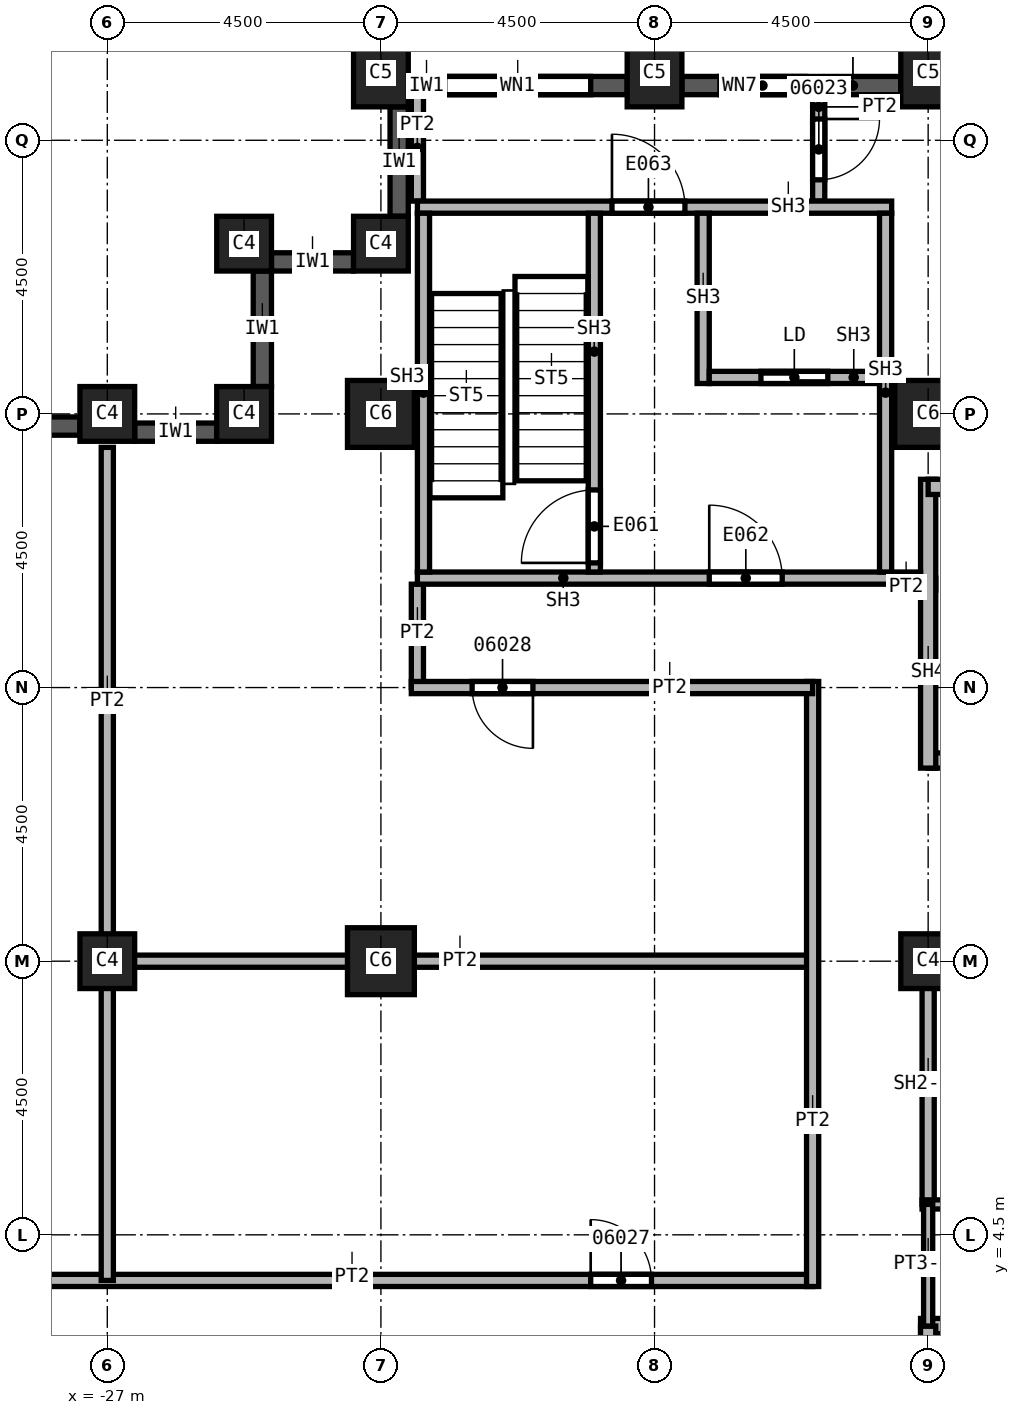
"""IFC4 building model, lengths in metres.
Left out: names, types, materials, properties, quantities, classifications, styles, units other than length and angle.
Written with IfcOpenShell. Run it as: python <this file> out.ifc"""

import sys

from ifc_helpers import new_model, si_unit, direction, frame, frame_2d, origin, origin_2d, place, context, subcontext, project, spatial, rectangle, extrude, element, fill, save


model = new_model("IFC4")
c1 = context("Model", 3, precision=1e-05, world=origin(), true_north=direction((0.0, 1.0)))
c2 = subcontext(c1, "Body", "Model", "MODEL_VIEW")
j1 = project(units=[si_unit("LENGTHUNIT", "METRE"), si_unit("PLANEANGLEUNIT", "RADIAN")], contexts=[c1])
p1 = place(None, origin())
s1 = spatial("IfcSite", under=j1, at=p1, CompositionType="ELEMENT")
p2 = place(p1, origin())
s2 = spatial("IfcBuilding", under=s1, at=p2, CompositionType="ELEMENT")
p3 = place(p2, frame((0.0, 0.0, 130.0)))
s3 = spatial("IfcBuildingStorey", under=s2, at=p3, CompositionType="ELEMENT", Elevation=130.0)
for number, where, z_axis, x_axis in (
    (1, (-13.5, 18.0, 0.0), (0.0, 0.0, 1.0), (1.0, 0.0, 0.0)),
    (2, (-22.5, 9.0, 0.0), (0.0, 0.0, 1.0), (1.0, 0.0, 0.0)),
    (3, (-22.5, 18.0, 0.0), (0.0, 0.0, 1.0), (1.0, 0.0, 0.0)),
):
    element("IfcColumn", number, at=place(p3, frame(where, z_axis=z_axis, x_axis=x_axis)), inside=s3, PredefinedType="COLUMN", context=c2, shape_type="SweptSolid", body=[
        extrude(rectangle(XDim=1.1, YDim=1.1, at=origin_2d()), origin(), (0.0, 0.0, 1.0), 3.7),
    ])
p4 = place(p3, frame((-13.5, 9.0, 0.0), z_axis=(0.0, 0.0, 1.0), x_axis=(1.0, 0.0, 0.0)))
e4 = element("IfcColumn", 4, at=p4, inside=s3, PredefinedType="COLUMN", context=c2, shape_type="SweptSolid", body=[
    extrude(rectangle(XDim=0.9, YDim=0.9, at=origin_2d()), origin(), (0.0, 0.0, 1.0), 3.7),
])
for number, where, z_axis, x_axis in (
    (5, (-13.5, 23.6, 0.0), (0.0, 0.0, 1.0), (1.0, 0.0, 0.0)),
    (6, (-18.0, 23.6, 0.0), (0.0, 0.0, 1.0), (1.0, 0.0, 0.0)),
    (7, (-22.5, 23.6, 0.0), (0.0, 0.0, 1.0), (1.0, 0.0, 0.0)),
):
    element("IfcColumn", number, at=place(p3, frame(where, z_axis=z_axis, x_axis=x_axis)), inside=s3, PredefinedType="COLUMN", context=c2, shape_type="SweptSolid", body=[
        extrude(rectangle(XDim=0.9, YDim=1.1, at=origin_2d()), origin(), (0.0, 0.0, 1.0), 3.7),
    ])
for number, where, z_axis, x_axis in (
    (8, (-27.0, 9.0, 0.0), (0.0, 0.0, 1.0), (1.0, 0.0, 0.0)),
    (9, (-27.0, 18.0, 0.0), (0.0, 0.0, 1.0), (1.0, 0.0, 0.0)),
    (10, (-22.5, 20.8, 0.0), (0.0, 0.0, 1.0), (1.0, 0.0, 0.0)),
    (11, (-24.75, 20.8, 0.0), (0.0, 0.0, 1.0), (1.0, 0.0, 0.0)),
    (12, (-24.75, 18.0, 0.0), (0.0, 0.0, 1.0), (1.0, 0.0, 0.0)),
):
    element("IfcColumn", number, at=place(p3, frame(where, z_axis=z_axis, x_axis=x_axis)), inside=s3, PredefinedType="COLUMN", context=c2, shape_type="SweptSolid", body=[
        extrude(rectangle(XDim=0.9, YDim=0.9, at=origin_2d()), origin(), (0.0, 0.0, 1.0), 3.7),
    ])
p5 = place(p3, frame((-22.2, 23.05, 0.0), z_axis=(0.0, 0.0, 1.0), x_axis=(0.0, -1.0, 0.0)))
e13 = element("IfcWall", 13, at=p5, inside=s3, PredefinedType="SOLIDWALL", context=c2, shape_type="SweptSolid", body=[
    extrude(rectangle(XDim=1.8, YDim=0.3, at=frame_2d((0.9, 0.0))), origin(), (0.0, 0.0, 1.0), 3.1),
])
p6 = place(p3, frame((-22.95, 20.5, 0.0), z_axis=(0.0, 0.0, 1.0), x_axis=(-1.0, 0.0, 0.0)))
e14 = element("IfcWall", 14, at=p6, inside=s3, PredefinedType="SOLIDWALL", context=c2, shape_type="SweptSolid", body=[
    extrude(rectangle(XDim=1.35, YDim=0.3, at=frame_2d((0.675, 0.0))), origin(), (0.0, 0.0, 1.0), 3.1),
])
p7 = place(p3, frame((-24.45, 20.35, 0.0), z_axis=(0.0, 0.0, 1.0), x_axis=(0.0, -1.0, 0.0)))
e15 = element("IfcWall", 15, at=p7, inside=s3, PredefinedType="SOLIDWALL", context=c2, shape_type="SweptSolid", body=[
    extrude(rectangle(XDim=1.9, YDim=0.3, at=frame_2d((0.95, 0.0))), origin(), (0.0, 0.0, 1.0), 3.1),
])
p8 = place(p3, frame((-25.2, 17.7, 0.0), z_axis=(0.0, 0.0, 1.0), x_axis=(-1.0, 0.0, 0.0)))
e16 = element("IfcWall", 16, at=p8, inside=s3, PredefinedType="SOLIDWALL", context=c2, shape_type="SweptSolid", body=[
    extrude(rectangle(XDim=1.35, YDim=0.3, at=frame_2d((0.675, 0.0))), origin(), (0.0, 0.0, 1.0), 3.1),
])
p9 = place(p3, frame((-27.45, 17.8, 0.0), z_axis=(0.0, 0.0, 1.0), x_axis=(-1.0, 0.0, 0.0)))
e17 = element("IfcWall", 17, at=p9, inside=s3, PredefinedType="SOLIDWALL", context=c2, shape_type="SweptSolid", body=[
    extrude(rectangle(XDim=3.6, YDim=0.3, at=frame_2d((1.8, 0.0))), origin(), (0.0, 0.0, 1.0), 3.1),
])
p10 = place(p9, frame((0.6, 0.0, 0.8)))
e18 = element("IfcOpeningElement", 18, at=p10, cuts=e17, PredefinedType="OPENING", context=c2, shape_type="SweptSolid", body=[
    extrude(rectangle(XDim=2.4, YDim=1.95, at=frame_2d((1.2, 0.975))), frame((0.0, 0.15, 0.0), z_axis=(0.0, -1.0, 0.0), x_axis=(1.0, 0.0, 0.0)), (0.0, 0.0, 1.0), 0.3),
])
p11 = place(p3, frame((-13.95, 23.4, 0.0), z_axis=(0.0, 0.0, 1.0), x_axis=(-1.0, 0.0, 0.0)))
e19 = element("IfcWall", 19, at=p11, inside=s3, PredefinedType="SOLIDWALL", context=c2, shape_type="SweptSolid", body=[
    extrude(rectangle(XDim=3.6, YDim=0.3, at=frame_2d((1.8, 0.0))), origin(), (0.0, 0.0, 1.0), 3.1),
])
p12 = place(p11, frame((1.575, 0.0, 0.8)))
e20 = element("IfcOpeningElement", 20, at=p12, cuts=e19, PredefinedType="OPENING", context=c2, shape_type="SweptSolid", body=[
    extrude(rectangle(XDim=1.4, YDim=1.95, at=frame_2d((0.7, 0.975))), frame((0.0, 0.15, 0.0), z_axis=(0.0, -1.0, 0.0), x_axis=(1.0, 0.0, 0.0)), (0.0, 0.0, 1.0), 0.3),
])
p13 = place(p3, frame((-18.45, 23.4, 0.0), z_axis=(0.0, 0.0, 1.0), x_axis=(-1.0, 0.0, 0.0)))
e21 = element("IfcWall", 21, at=p13, inside=s3, PredefinedType="SOLIDWALL", context=c2, shape_type="SweptSolid", body=[
    extrude(rectangle(XDim=3.6, YDim=0.3, at=frame_2d((1.8, 0.0))), origin(), (0.0, 0.0, 1.0), 3.1),
])
p14 = place(p13, frame((0.6, 0.0, 0.8)))
e22 = element("IfcOpeningElement", 22, at=p14, cuts=e21, PredefinedType="OPENING", context=c2, shape_type="SweptSolid", body=[
    extrude(rectangle(XDim=2.4, YDim=1.95, at=frame_2d((1.2, 0.975))), frame((0.0, 0.15, 0.0), z_axis=(0.0, -1.0, 0.0), x_axis=(1.0, 0.0, 0.0)), (0.0, 0.0, 1.0), 0.3),
])
p15 = place(p3, frame((-33.85, 3.75, 0.0), z_axis=(0.0, 0.0, 1.0), x_axis=(1.0, 0.0, 0.0)))
e23 = element("IfcWall", 23, at=p15, inside=s3, PredefinedType="PARTITIONING", context=c2, shape_type="SweptSolid", body=[
    extrude(rectangle(XDim=18.45, YDim=0.2, at=frame_2d((9.225, 0.0))), origin(), (0.0, 0.0, 1.0), 3.7),
])
p16 = place(p15, frame((14.8, 0.0, 0.0)))
e24 = element("IfcOpeningElement", 24, at=p16, cuts=e23, PredefinedType="OPENING", context=c2, shape_type="SweptSolid", body=[
    extrude(rectangle(XDim=1.0, YDim=2.1, at=frame_2d((0.5, 1.05))), frame((0.0, 0.1, 0.0), z_axis=(0.0, -1.0, 0.0), x_axis=(1.0, 0.0, 0.0)), (0.0, 0.0, 1.0), 0.2),
])
p17 = place(p3, frame((-27.1, 9.0, 0.0), z_axis=(0.0, 0.0, 1.0), x_axis=(1.0, 0.0, 0.0)))
e25 = element("IfcWall", 25, at=p17, inside=s3, PredefinedType="PARTITIONING", context=c2, shape_type="SweptSolid", body=[
    extrude(rectangle(XDim=11.7, YDim=0.2, at=frame_2d((5.85, 0.0))), origin(), (0.0, 0.0, 1.0), 3.7),
])
p18 = place(p3, frame((-27.0, 3.75, 0.0), z_axis=(0.0, 0.0, 1.0), x_axis=(0.0, 1.0, 0.0)))
e26 = element("IfcWall", 26, at=p18, inside=s3, PredefinedType="PARTITIONING", context=c2, shape_type="SweptSolid", body=[
    extrude(rectangle(XDim=13.7, YDim=0.2, at=frame_2d((6.85, 0.0))), origin(), (0.0, 0.0, 1.0), 3.7),
])
p19 = place(p3, frame((-21.9, 13.5, 0.0), z_axis=(0.0, 0.0, 1.0), x_axis=(0.0, 1.0, 0.0)))
e27 = element("IfcWall", 27, at=p19, inside=s3, PredefinedType="PARTITIONING", context=c2, shape_type="SweptSolid", body=[
    extrude(rectangle(XDim=1.7, YDim=0.2, at=frame_2d((0.85, 0.0))), origin(), (0.0, 0.0, 1.0), 3.7),
])
p20 = place(p3, frame((-21.9, 21.5, 0.0), z_axis=(0.0, 0.0, 1.0), x_axis=(0.0, 1.0, 0.0)))
e28 = element("IfcWall", 28, at=p20, inside=s3, PredefinedType="PARTITIONING", context=c2, shape_type="SweptSolid", body=[
    extrude(rectangle(XDim=1.75, YDim=0.2, at=frame_2d((0.875, 0.0))), origin(), (0.0, 0.0, 1.0), 3.7),
])
p21 = place(p3, frame((-15.4, 3.65, 0.0), z_axis=(0.0, 0.0, 1.0), x_axis=(0.0, 1.0, 0.0)))
e29 = element("IfcWall", 29, at=p21, inside=s3, PredefinedType="PARTITIONING", context=c2, shape_type="SweptSolid", body=[
    extrude(rectangle(XDim=9.95, YDim=0.2, at=frame_2d((4.975, 0.0))), origin(), (0.0, 0.0, 1.0), 3.7),
])
p22 = place(p3, frame((-15.4, 13.5, 0.0), z_axis=(0.0, 0.0, 1.0), x_axis=(-1.0, 0.0, 0.0)))
e30 = element("IfcWall", 30, at=p22, inside=s3, PredefinedType="PARTITIONING", context=c2, shape_type="SweptSolid", body=[
    extrude(rectangle(XDim=6.6, YDim=0.2, at=frame_2d((3.3, 0.0))), origin(), (0.0, 0.0, 1.0), 3.7),
])
p23 = place(p22, frame((4.6, 0.0, 0.0)))
e31 = element("IfcOpeningElement", 31, at=p23, cuts=e30, PredefinedType="OPENING", context=c2, shape_type="SweptSolid", body=[
    extrude(rectangle(XDim=1.0, YDim=2.1, at=frame_2d((0.5, 1.05))), frame((0.0, 0.1, 0.0), z_axis=(0.0, -1.0, 0.0), x_axis=(1.0, 0.0, 0.0)), (0.0, 0.0, 1.0), 0.2),
])
p24 = place(p3, frame((-15.3, 23.25, 0.0), z_axis=(0.0, 0.0, 1.0), x_axis=(0.0, -1.0, 0.0)))
e32 = element("IfcWall", 32, at=p24, inside=s3, PredefinedType="PARTITIONING", context=c2, shape_type="SweptSolid", body=[
    extrude(rectangle(XDim=1.75, YDim=0.2, at=frame_2d((0.875, 0.0))), origin(), (0.0, 0.0, 1.0), 3.7),
])
p25 = place(p24, frame((0.4, 0.0, 0.0)))
e33 = element("IfcOpeningElement", 33, at=p25, cuts=e32, PredefinedType="OPENING", context=c2, shape_type="SweptSolid", body=[
    extrude(rectangle(XDim=1.0, YDim=2.1, at=frame_2d((0.5, 1.05))), frame((0.0, 0.1, 0.0), z_axis=(0.0, -1.0, 0.0), x_axis=(1.0, 0.0, 0.0)), (0.0, 0.0, 1.0), 0.2),
])
p26 = place(p3, frame((-14.1, 15.2, 0.0), z_axis=(0.0, 0.0, 1.0), x_axis=(1.0, 0.0, 0.0)))
e34 = element("IfcWall", 34, at=p26, inside=s3, PredefinedType="PARTITIONING", context=c2, shape_type="SweptSolid", body=[
    extrude(rectangle(XDim=0.725, YDim=0.2, at=frame_2d((0.363, 0.0))), origin(), (0.0, 0.0, 1.0), 3.7),
])
p27 = place(p3, frame((-13.5, 5.0, 0.0), z_axis=(0.0, 0.0, 1.0), x_axis=(0.0, 1.0, 0.0)))
e35 = element("IfcWall", 35, at=p27, inside=s3, PredefinedType="SOLIDWALL", context=c2, shape_type="SweptSolid", body=[
    extrude(rectangle(XDim=4.1, YDim=0.2, at=frame_2d((2.05, 0.0))), origin(), (0.0, 0.0, 1.0), 2.938),
])
p28 = place(p3, frame((-13.5, 9.0, 0.0), z_axis=(0.0, 0.0, 1.0), x_axis=(1.0, 0.0, 0.0)))
e36 = element("IfcWall", 36, at=p28, inside=s3, PredefinedType="SOLIDWALL", context=c2, shape_type="SweptSolid", body=[
    extrude(rectangle(XDim=3.0, YDim=0.2, at=frame_2d((1.5, 0.0))), origin(), (0.0, 0.0, 1.0), 2.938),
])
p29 = place(p3, frame((-13.625, 3.0, 0.0), z_axis=(0.0, 0.0, 1.0), x_axis=(1.0, 0.0, 0.0)))
e37 = element("IfcWall", 37, at=p29, inside=s3, PredefinedType="SOLIDWALL", context=c2, shape_type="SweptSolid", body=[
    extrude(rectangle(XDim=6.125, YDim=0.25, at=frame_2d((3.062, 0.0))), origin(), (0.0, 0.0, 1.0), 3.7),
])
p30 = place(p29, frame((3.25, 0.0, 0.0)))
e38 = element("IfcOpeningElement", 38, at=p30, cuts=e37, PredefinedType="OPENING", context=c2, shape_type="SweptSolid", body=[
    extrude(rectangle(XDim=1.1, YDim=2.1, at=frame_2d((0.55, 1.05))), frame((0.0, 0.125, 0.0), z_axis=(0.0, -1.0, 0.0), x_axis=(1.0, 0.0, 0.0)), (0.0, 0.0, 1.0), 0.25),
])
p31 = place(p3, frame((-13.5, -3.0, 0.0), z_axis=(0.0, 0.0, 1.0), x_axis=(0.0, 1.0, 0.0)))
e39 = element("IfcWall", 39, at=p31, inside=s3, PredefinedType="SOLIDWALL", context=c2, shape_type="SweptSolid", body=[
    extrude(rectangle(XDim=6.0, YDim=0.25, at=frame_2d((3.0, 0.0))), origin(), (0.0, 0.0, 1.0), 2.938),
])
p32 = place(p3, frame((-13.5, 12.3, 0.0), z_axis=(0.0, 0.0, 1.0), x_axis=(1.0, 0.0, 0.0)))
e40 = element("IfcWall", 40, at=p32, inside=s3, PredefinedType="SOLIDWALL", context=c2, shape_type="SweptSolid", body=[
    extrude(rectangle(XDim=9.125, YDim=0.25, at=frame_2d((4.562, 0.0))), origin(), (0.0, 0.0, 1.0), 3.7),
])
p33 = place(p32, frame((0.6, 0.0, 0.0)))
e41 = element("IfcOpeningElement", 41, at=p33, cuts=e40, PredefinedType="OPENING", context=c2, shape_type="SweptSolid", body=[
    extrude(rectangle(XDim=1.2, YDim=2.1, at=frame_2d((0.6, 1.05))), frame((0.0, 0.125, 0.0), z_axis=(0.0, -1.0, 0.0), x_axis=(1.0, 0.0, 0.0)), (0.0, 0.0, 1.0), 0.25),
])
p34 = place(p3, frame((-13.5, 12.175, 0.0), z_axis=(0.0, 0.0, 1.0), x_axis=(0.0, 1.0, 0.0)))
e42 = element("IfcWall", 42, at=p34, inside=s3, PredefinedType="SOLIDWALL", context=c2, shape_type="SweptSolid", body=[
    extrude(rectangle(XDim=4.75, YDim=0.25, at=frame_2d((2.375, 0.0))), origin(), (0.0, 0.0, 1.0), 3.7),
])
p35 = place(p3, frame((-13.5, 16.8, 0.0), z_axis=(0.0, 0.0, 1.0), x_axis=(1.0, 0.0, 0.0)))
e43 = element("IfcWall", 43, at=p35, inside=s3, PredefinedType="SOLIDWALL", context=c2, shape_type="SweptSolid", body=[
    extrude(rectangle(XDim=9.125, YDim=0.25, at=frame_2d((4.562, 0.0))), origin(), (0.0, 0.0, 1.0), 3.7),
])
p36 = place(p3, frame((-13.6, 5.0, 0.0), z_axis=(0.0, 0.0, 1.0), x_axis=(1.0, 0.0, 0.0)))
e44 = element("IfcWall", 44, at=p36, inside=s3, PredefinedType="PARTITIONING", context=c2, shape_type="SweptSolid", body=[
    extrude(rectangle(XDim=3.1, YDim=0.15, at=frame_2d((1.55, 0.0))), origin(), (0.0, 0.0, 1.0), 3.7),
])
p37 = place(p3, frame((-13.5, 3.0, 0.0), z_axis=(0.0, 0.0, 1.0), x_axis=(0.0, 1.0, 0.0)))
e45 = element("IfcWall", 45, at=p37, inside=s3, PredefinedType="PARTITIONING", context=c2, shape_type="SweptSolid", body=[
    extrude(rectangle(XDim=2.0, YDim=0.15, at=frame_2d((1.0, 0.0))), origin(), (0.0, 0.0, 1.0), 2.938),
])
p38 = place(p3, frame((-21.9, 15.3, 0.0), z_axis=(0.0, 0.0, 1.0), x_axis=(1.0, 0.0, 0.0)))
e46 = element("IfcWall", 46, at=p38, inside=s3, PredefinedType="SOLIDWALL", context=c2, shape_type="SweptSolid", body=[
    extrude(rectangle(XDim=8.275, YDim=0.2, at=frame_2d((4.137, 0.0))), origin(), (0.0, 0.0, 1.0), 3.7),
])
p39 = place(p38, frame((4.8, 0.0, 0.0)))
e47 = element("IfcOpeningElement", 47, at=p39, cuts=e46, PredefinedType="OPENING", context=c2, shape_type="SweptSolid", body=[
    extrude(rectangle(XDim=1.2, YDim=2.1, at=frame_2d((0.6, 1.05))), frame((0.0, 0.1, 0.0), z_axis=(0.0, -1.0, 0.0), x_axis=(1.0, 0.0, 0.0)), (0.0, 0.0, 1.0), 0.2),
])
p40 = place(p3, frame((-21.9, 21.4, 0.0), z_axis=(0.0, 0.0, 1.0), x_axis=(1.0, 0.0, 0.0)))
e48 = element("IfcWall", 48, at=p40, inside=s3, PredefinedType="SOLIDWALL", context=c2, shape_type="SweptSolid", body=[
    extrude(rectangle(XDim=7.8, YDim=0.2, at=frame_2d((3.9, 0.0))), origin(), (0.0, 0.0, 1.0), 3.7),
])
p41 = place(p40, frame((3.2, 0.0, 0.0)))
e49 = element("IfcOpeningElement", 49, at=p41, cuts=e48, PredefinedType="OPENING", context=c2, shape_type="SweptSolid", body=[
    extrude(rectangle(XDim=1.2, YDim=2.1, at=frame_2d((0.6, 1.05))), frame((0.0, 0.1, 0.0), z_axis=(0.0, -1.0, 0.0), x_axis=(1.0, 0.0, 0.0)), (0.0, 0.0, 1.0), 0.2),
])
for number, where, z_axis, x_axis in (
    (50, (-21.8, 15.4, 0.0), (0.0, 0.0, 1.0), (0.0, 1.0, 0.0)),
    (51, (-14.2, 15.4, 0.0), (0.0, 0.0, 1.0), (0.0, 1.0, 0.0)),
):
    element("IfcWall", number, at=place(p3, frame(where, z_axis=z_axis, x_axis=x_axis)), inside=s3, PredefinedType="SOLIDWALL", context=c2, shape_type="SweptSolid", body=[
        extrude(rectangle(XDim=5.9, YDim=0.2, at=frame_2d((2.95, 0.0))), origin(), (0.0, 0.0, 1.0), 3.7),
    ])
p42 = place(p3, frame((-18.99, 15.4, 0.0), z_axis=(0.0, 0.0, 1.0), x_axis=(0.0, 1.0, 0.0)))
e52 = element("IfcWall", 52, at=p42, inside=s3, PredefinedType="SOLIDWALL", context=c2, shape_type="SweptSolid", body=[
    extrude(rectangle(XDim=5.9, YDim=0.2, at=frame_2d((2.95, 0.0))), origin(), (0.0, 0.0, 1.0), 3.7),
])
p43 = place(p42, frame((0.15, 0.0, 0.0)))
e53 = element("IfcOpeningElement", 53, at=p43, cuts=e52, PredefinedType="OPENING", context=c2, shape_type="SweptSolid", body=[
    extrude(rectangle(XDim=1.2, YDim=2.1, at=frame_2d((0.6, 1.05))), frame((0.0, 0.1, 0.0), z_axis=(0.0, -1.0, 0.0), x_axis=(1.0, 0.0, 0.0)), (0.0, 0.0, 1.0), 0.2),
])
p44 = place(p3, frame((-17.2, 18.5, 0.0), z_axis=(0.0, 0.0, 1.0), x_axis=(0.0, 1.0, 0.0)))
e54 = element("IfcWall", 54, at=p44, inside=s3, PredefinedType="SOLIDWALL", context=c2, shape_type="SweptSolid", body=[
    extrude(rectangle(XDim=2.8, YDim=0.2, at=frame_2d((1.4, 0.0))), origin(), (0.0, 0.0, 1.0), 3.7),
])
p45 = place(p3, frame((-17.1, 18.6, 0.0), z_axis=(0.0, 0.0, 1.0), x_axis=(1.0, 0.0, 0.0)))
e55 = element("IfcWall", 55, at=p45, inside=s3, PredefinedType="SOLIDWALL", context=c2, shape_type="SweptSolid", body=[
    extrude(rectangle(XDim=2.8, YDim=0.2, at=frame_2d((1.4, 0.0))), origin(), (0.0, 0.0, 1.0), 3.7),
])
p46 = place(p45, frame((0.85, 0.0, 0.0)))
e56 = element("IfcOpeningElement", 56, at=p46, cuts=e55, PredefinedType="OPENING", context=c2, shape_type="SweptSolid", body=[
    extrude(rectangle(XDim=1.1, YDim=2.1, at=frame_2d((0.55, 1.05))), frame((0.0, 0.1, 0.0), z_axis=(0.0, -1.0, 0.0), x_axis=(1.0, 0.0, 0.0)), (0.0, 0.0, 1.0), 0.2),
])
p47 = place(p14, origin())
e57 = element("IfcWindow", 57, at=p47, inside=s3, PartitioningType="SINGLE_PANEL", PredefinedType="WINDOW", context=c2, shape_type="SweptSolid", body=[
    extrude(rectangle(XDim=2.4, YDim=1.95, at=frame_2d((1.2, 0.975))), frame((0.0, 0.03, 0.0), z_axis=(0.0, -1.0, 0.0), x_axis=(1.0, 0.0, 0.0)), (0.0, 0.0, 1.0), 0.06),
])
fill(e22, e57)
p48 = place(p25, origin())
e58 = element("IfcDoor", 58, at=p48, inside=s3, OperationType="SINGLE_SWING_RIGHT", PredefinedType="DOOR", context=c2, shape_type="SweptSolid", body=[
    extrude(rectangle(XDim=1.0, YDim=2.1, at=frame_2d((0.5, 1.05))), frame((0.0, 0.025, 0.0), z_axis=(0.0, -1.0, 0.0), x_axis=(1.0, 0.0, 0.0)), (0.0, 0.0, 1.0), 0.05),
])
fill(e33, e58)
p49 = place(p16, origin())
e59 = element("IfcDoor", 59, at=p49, inside=s3, OperationType="SINGLE_SWING_RIGHT", PredefinedType="DOOR", context=c2, shape_type="SweptSolid", body=[
    extrude(rectangle(XDim=1.0, YDim=2.1, at=frame_2d((0.5, 1.05))), frame((0.0, 0.025, 0.0), z_axis=(0.0, -1.0, 0.0), x_axis=(1.0, 0.0, 0.0)), (0.0, 0.0, 1.0), 0.05),
])
fill(e24, e59)
p50 = place(p23, origin())
e60 = element("IfcDoor", 60, at=p50, inside=s3, OperationType="SINGLE_SWING_LEFT", PredefinedType="DOOR", context=c2, shape_type="SweptSolid", body=[
    extrude(rectangle(XDim=1.0, YDim=2.1, at=frame_2d((0.5, 1.05))), frame((0.0, 0.025, 0.0), z_axis=(0.0, -1.0, 0.0), x_axis=(1.0, 0.0, 0.0)), (0.0, 0.0, 1.0), 0.05),
])
fill(e31, e60)
p51 = place(p43, origin())
e61 = element("IfcDoor", 61, at=p51, inside=s3, OperationType="SINGLE_SWING_LEFT", PredefinedType="DOOR", context=c2, shape_type="SweptSolid", body=[
    extrude(rectangle(XDim=1.2, YDim=2.1, at=frame_2d((0.6, 1.05))), frame((0.0, 0.025, 0.0), z_axis=(0.0, -1.0, 0.0), x_axis=(1.0, 0.0, 0.0)), (0.0, 0.0, 1.0), 0.05),
])
fill(e53, e61)
p52 = place(p46, origin())
e62 = element("IfcDoor", 62, at=p52, inside=s3, OperationType="SLIDING_TO_LEFT", PredefinedType="DOOR", context=c2, shape_type="SweptSolid", body=[
    extrude(rectangle(XDim=1.1, YDim=2.1, at=frame_2d((0.55, 1.05))), frame((0.0, 0.025, 0.0), z_axis=(0.0, -1.0, 0.0), x_axis=(1.0, 0.0, 0.0)), (0.0, 0.0, 1.0), 0.05),
])
fill(e56, e62)
p53 = place(p39, origin())
e63 = element("IfcDoor", 63, at=p53, inside=s3, OperationType="SINGLE_SWING_RIGHT", PredefinedType="DOOR", context=c2, shape_type="SweptSolid", body=[
    extrude(rectangle(XDim=1.2, YDim=2.1, at=frame_2d((0.6, 1.05))), frame((0.0, 0.025, 0.0), z_axis=(0.0, -1.0, 0.0), x_axis=(1.0, 0.0, 0.0)), (0.0, 0.0, 1.0), 0.05),
])
fill(e47, e63)
p54 = place(p41, origin())
e64 = element("IfcDoor", 64, at=p54, inside=s3, OperationType="SINGLE_SWING_LEFT", PredefinedType="DOOR", context=c2, shape_type="SweptSolid", body=[
    extrude(rectangle(XDim=1.2, YDim=2.1, at=frame_2d((0.6, 1.05))), frame((0.0, 0.025, 0.0), z_axis=(0.0, -1.0, 0.0), x_axis=(1.0, 0.0, 0.0)), (0.0, 0.0, 1.0), 0.05),
])
fill(e49, e64)
p55 = place(p12, origin())
e65 = element("IfcWindow", 65, at=p55, inside=s3, PartitioningType="SINGLE_PANEL", PredefinedType="WINDOW", context=c2, shape_type="SweptSolid", body=[
    extrude(rectangle(XDim=1.4, YDim=1.95, at=frame_2d((0.7, 0.975))), frame((0.0, 0.03, 0.0), z_axis=(0.0, -1.0, 0.0), x_axis=(1.0, 0.0, 0.0)), (0.0, 0.0, 1.0), 0.06),
])
fill(e20, e65)
save(model, sys.argv[1])
